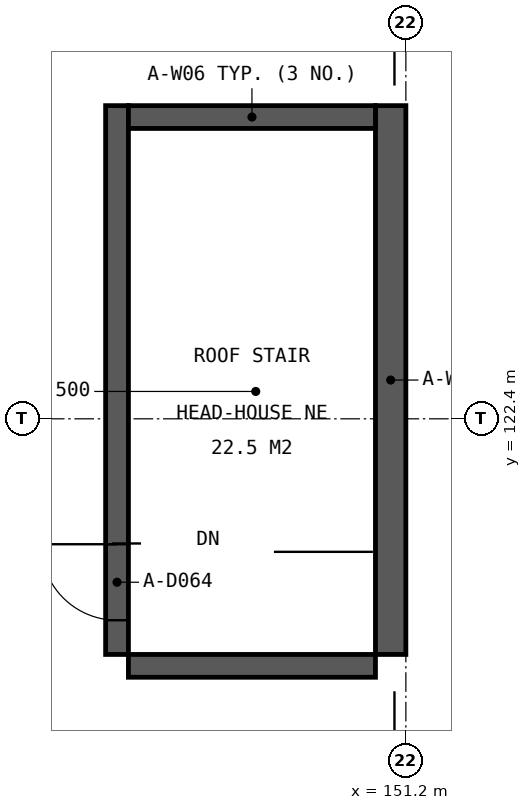
"""IFC4 building model, lengths in metres.
Left out: names, types, materials, properties, quantities, classifications, styles, units other than length and angle.
Written with IfcOpenShell. Run it as: python <this file> out.ifc"""

import sys

from ifc_helpers import new_model, si_unit, direction, frame, frame_2d, origin, place, context, subcontext, project, spatial, rectangle, extrude, element, fill, save


model = new_model("IFC4")
c1 = context("Model", 3, precision=1e-05, world=origin(), true_north=direction((0.0, 1.0)))
c2 = subcontext(c1, "Body", "Model", "MODEL_VIEW")
j1 = project(units=[si_unit("LENGTHUNIT", "METRE"), si_unit("PLANEANGLEUNIT", "RADIAN")], contexts=[c1])
p1 = place(None, origin())
s1 = spatial("IfcSite", under=j1, at=p1, CompositionType="ELEMENT")
p2 = place(p1, origin())
s2 = spatial("IfcBuilding", under=s1, at=p2, CompositionType="ELEMENT")
p3 = place(p2, frame((0.0, 0.0, 4.8)))
s3 = spatial("IfcBuildingStorey", under=s2, at=p3, CompositionType="ELEMENT", Elevation=4.8)
p4 = place(p3, frame((151.0, 119.3, 0.0), z_axis=(0.0, 0.0, 1.0), x_axis=(0.0, 1.0, 0.0)))
e1 = element("IfcWall", 1, at=p4, inside=s3, PredefinedType="SHEAR", context=c2, shape_type="SweptSolid", body=[
    extrude(rectangle(XDim=7.22, YDim=0.4, at=frame_2d((3.61, 0.0))), origin(), (0.0, 0.0, 1.0), 2.5),
])
p5 = place(p3, frame((147.4, 119.3, 0.0), z_axis=(0.0, 0.0, 1.0), x_axis=(0.0, 1.0, 0.0)))
e2 = element("IfcWall", 2, at=p5, inside=s3, PredefinedType="SHEAR", context=c2, shape_type="SweptSolid", body=[
    extrude(rectangle(XDim=7.22, YDim=0.3, at=frame_2d((3.61, 0.0))), origin(), (0.0, 0.0, 1.0), 2.5),
])
p6 = place(p5, frame((0.45, 0.0, 0.0)))
e3 = element("IfcOpeningElement", 3, at=p6, cuts=e2, PredefinedType="OPENING", context=c2, shape_type="SweptSolid", body=[
    extrude(rectangle(XDim=1.0, YDim=2.1, at=frame_2d((0.5, 1.05))), frame((0.0, 0.16, 0.0), z_axis=(0.0, -1.0, 0.0), x_axis=(1.0, 0.0, 0.0)), (0.0, 0.0, 1.0), 0.32),
])
for number, where, z_axis, x_axis in (
    (4, (150.8, 126.37, 0.0), (0.0, 0.0, 1.0), (-1.0, 0.0, 0.0)),
    (5, (150.8, 119.15, 0.0), (0.0, 0.0, 1.0), (-1.0, 0.0, 0.0)),
):
    element("IfcWall", number, at=place(p3, frame(where, z_axis=z_axis, x_axis=x_axis)), inside=s3, PredefinedType="SHEAR", context=c2, shape_type="SweptSolid", body=[
        extrude(rectangle(XDim=3.25, YDim=0.3, at=frame_2d((1.625, 0.0))), origin(), (0.0, 0.0, 1.0), 2.5),
    ])
p7 = place(p6, origin())
e6 = element("IfcDoor", 6, at=p7, inside=s3, OperationType="SINGLE_SWING_RIGHT", PredefinedType="DOOR", context=c2, shape_type="SweptSolid", body=[
    extrude(rectangle(XDim=1.0, YDim=2.1, at=frame_2d((0.5, 1.05))), frame((0.0, 0.025, 0.0), z_axis=(0.0, -1.0, 0.0), x_axis=(1.0, 0.0, 0.0)), (0.0, 0.0, 1.0), 0.05),
])
fill(e3, e6)
save(model, sys.argv[1])
